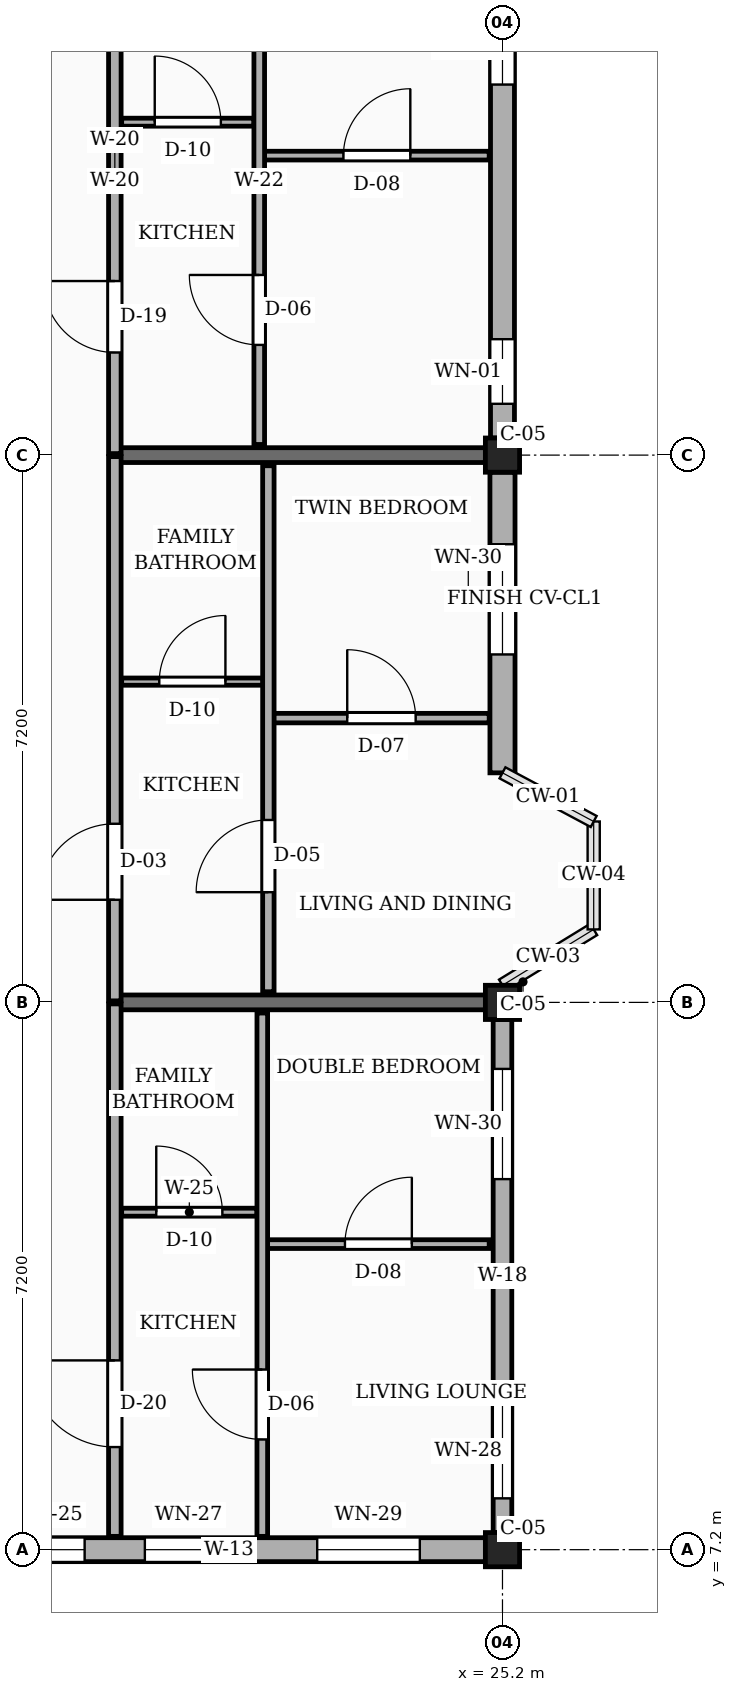
"""IFC4 building model, lengths in metres.
Left out: names, types, materials, properties, quantities, classifications, styles, units other than length and angle.
Written with IfcOpenShell. Run it as: python <this file> out.ifc"""

import sys

from ifc_helpers import new_model, si_unit, direction, frame, frame_2d, origin, origin_2d, place, context, subcontext, project, spatial, rectangle, extrude, element, fill, save


model = new_model("IFC4")
c1 = context("Model", 3, precision=1e-05, world=origin(), true_north=direction((0.0, 1.0)))
c2 = subcontext(c1, "Body", "Model", "MODEL_VIEW")
j1 = project(units=[si_unit("LENGTHUNIT", "METRE"), si_unit("PLANEANGLEUNIT", "RADIAN")], contexts=[c1])
p1 = place(None, origin())
s1 = spatial("IfcSite", under=j1, at=p1, CompositionType="ELEMENT")
p2 = place(p1, origin())
s2 = spatial("IfcBuilding", under=s1, at=p2, CompositionType="ELEMENT")
p3 = place(p2, frame((0.0, 0.0, 42.3)))
s3 = spatial("IfcBuildingStorey", under=s2, at=p3, CompositionType="ELEMENT", Elevation=42.3)
for number, where, z_axis, x_axis in (
    (1, (25.2, 7.2, 0.0), (0.0, 0.0, 1.0), (1.0, 0.0, 0.0)),
    (2, (25.2, 14.4, 0.0), (0.0, 0.0, 1.0), (1.0, 0.0, 0.0)),
    (3, (25.2, 21.6, 0.0), (0.0, 0.0, 1.0), (1.0, 0.0, 0.0)),
):
    element("IfcColumn", number, at=place(p3, frame(where, z_axis=z_axis, x_axis=x_axis)), inside=s3, PredefinedType="COLUMN", context=c2, shape_type="SweptSolid", body=[
        extrude(rectangle(XDim=0.45, YDim=0.45, at=origin_2d()), origin(), (0.0, 0.0, 1.0), 3.15),
    ])
for number, where, z_axis, x_axis in (
    (4, (20.1, 14.4, 0.0), (0.0, 0.0, 1.0), (1.0, 0.0, 0.0)),
    (5, (20.1, 21.6, 0.0), (0.0, 0.0, 1.0), (1.0, 0.0, 0.0)),
):
    element("IfcWall", number, at=place(p3, frame(where, z_axis=z_axis, x_axis=x_axis)), inside=s3, PredefinedType="SOLIDWALL", context=c2, shape_type="SweptSolid", body=[
        extrude(rectangle(XDim=4.875, YDim=0.195, at=frame_2d((2.438, 0.0))), origin(), (0.0, 0.0, 1.0), 2.17),
    ])
p4 = place(p3, frame((18.225, 7.2, 0.0), z_axis=(0.0, 0.0, 1.0), x_axis=(1.0, 0.0, 0.0)))
e6 = element("IfcWall", 6, at=p4, inside=s3, PredefinedType="SOLIDWALL", context=c2, shape_type="SweptSolid", body=[
    extrude(rectangle(XDim=6.75, YDim=0.315, at=frame_2d((3.375, 0.0))), origin(), (0.0, 0.0, 1.0), 2.44),
])
p5 = place(p4, frame((0.538, 0.0, 0.78)))
e7 = element("IfcOpeningElement", 7, at=p5, cuts=e6, PredefinedType="OPENING", context=c2, shape_type="SweptSolid", body=[
    extrude(rectangle(XDim=0.94, YDim=1.44, at=frame_2d((0.47, 0.72))), frame((0.0, 0.167, 0.0), z_axis=(0.0, -1.0, 0.0), x_axis=(1.0, 0.0, 0.0)), (0.0, 0.0, 1.0), 0.335),
])
p6 = place(p4, frame((2.27, 0.0, 0.78)))
e8 = element("IfcOpeningElement", 8, at=p6, cuts=e6, PredefinedType="OPENING", context=c2, shape_type="SweptSolid", body=[
    extrude(rectangle(XDim=1.15, YDim=1.44, at=frame_2d((0.575, 0.72))), frame((0.0, 0.167, 0.0), z_axis=(0.0, -1.0, 0.0), x_axis=(1.0, 0.0, 0.0)), (0.0, 0.0, 1.0), 0.335),
])
p7 = place(p4, frame((4.538, 0.0, 0.78)))
e9 = element("IfcOpeningElement", 9, at=p7, cuts=e6, PredefinedType="OPENING", context=c2, shape_type="SweptSolid", body=[
    extrude(rectangle(XDim=1.35, YDim=1.44, at=frame_2d((0.675, 0.72))), frame((0.0, 0.167, 0.0), z_axis=(0.0, -1.0, 0.0), x_axis=(1.0, 0.0, 0.0)), (0.0, 0.0, 1.0), 0.335),
])
p8 = place(p3, frame((25.2, 7.425, 0.0), z_axis=(0.0, 0.0, 1.0), x_axis=(0.0, 1.0, 0.0)))
e10 = element("IfcWall", 10, at=p8, inside=s3, PredefinedType="SOLIDWALL", context=c2, shape_type="SweptSolid", body=[
    extrude(rectangle(XDim=6.75, YDim=0.245, at=frame_2d((3.375, 0.0))), origin(), (0.0, 0.0, 1.0), 2.44),
])
p9 = place(p8, frame((0.45, 0.0, 0.78)))
e11 = element("IfcOpeningElement", 11, at=p9, cuts=e10, PredefinedType="OPENING", context=c2, shape_type="SweptSolid", body=[
    extrude(rectangle(XDim=1.25, YDim=1.44, at=frame_2d((0.625, 0.72))), frame((0.0, 0.133, 0.0), z_axis=(0.0, -1.0, 0.0), x_axis=(1.0, 0.0, 0.0)), (0.0, 0.0, 1.0), 0.265),
])
p10 = place(p8, frame((4.65, 0.0, 0.78)))
e12 = element("IfcOpeningElement", 12, at=p10, cuts=e10, PredefinedType="OPENING", context=c2, shape_type="SweptSolid", body=[
    extrude(rectangle(XDim=1.45, YDim=1.44, at=frame_2d((0.725, 0.72))), frame((0.0, 0.133, 0.0), z_axis=(0.0, -1.0, 0.0), x_axis=(1.0, 0.0, 0.0)), (0.0, 0.0, 1.0), 0.265),
])
p11 = place(p3, frame((25.2, 17.42, 0.0), z_axis=(0.0, 0.0, 1.0), x_axis=(0.0, 1.0, 0.0)))
e13 = element("IfcWall", 13, at=p11, inside=s3, PredefinedType="SOLIDWALL", context=c2, shape_type="SweptSolid", body=[
    extrude(rectangle(XDim=3.955, YDim=0.33, at=frame_2d((1.978, 0.0))), origin(), (0.0, 0.0, 1.0), 2.44),
])
p12 = place(p11, frame((1.558, 0.0, 0.78)))
e14 = element("IfcOpeningElement", 14, at=p12, cuts=e13, PredefinedType="OPENING", context=c2, shape_type="SweptSolid", body=[
    extrude(rectangle(XDim=1.45, YDim=1.44, at=frame_2d((0.725, 0.72))), frame((0.0, 0.175, 0.0), z_axis=(0.0, -1.0, 0.0), x_axis=(1.0, 0.0, 0.0)), (0.0, 0.0, 1.0), 0.35),
])
p13 = place(p3, frame((25.2, 21.825, 0.0), z_axis=(0.0, 0.0, 1.0), x_axis=(0.0, 1.0, 0.0)))
e15 = element("IfcWall", 15, at=p13, inside=s3, PredefinedType="SOLIDWALL", context=c2, shape_type="SweptSolid", body=[
    extrude(rectangle(XDim=6.75, YDim=0.315, at=frame_2d((3.375, 0.0))), origin(), (0.0, 0.0, 1.0), 2.44),
])
p14 = place(p13, frame((0.45, 0.0, 0.78)))
e16 = element("IfcOpeningElement", 16, at=p14, cuts=e15, PredefinedType="OPENING", context=c2, shape_type="SweptSolid", body=[
    extrude(rectangle(XDim=0.85, YDim=1.15, at=frame_2d((0.425, 0.575))), frame((0.0, 0.167, 0.0), z_axis=(0.0, -1.0, 0.0), x_axis=(1.0, 0.0, 0.0)), (0.0, 0.0, 1.0), 0.335),
])
p15 = place(p13, frame((4.65, 0.0, 0.78)))
e17 = element("IfcOpeningElement", 17, at=p15, cuts=e15, PredefinedType="OPENING", context=c2, shape_type="SweptSolid", body=[
    extrude(rectangle(XDim=1.0, YDim=1.15, at=frame_2d((0.5, 0.575))), frame((0.0, 0.167, 0.0), z_axis=(0.0, -1.0, 0.0), x_axis=(1.0, 0.0, 0.0)), (0.0, 0.0, 1.0), 0.335),
])
p16 = place(p3, frame((20.1, 7.375, 0.0), z_axis=(0.0, 0.0, 1.0), x_axis=(0.0, 1.0, 0.0)))
e18 = element("IfcWall", 18, at=p16, inside=s3, PredefinedType="PARTITIONING", context=c2, shape_type="SweptSolid", body=[
    extrude(rectangle(XDim=7.005, YDim=0.165, at=frame_2d((3.502, 0.0))), origin(), (0.0, 0.0, 1.0), 2.305),
])
p17 = place(p16, frame((1.175, 0.0, 0.0)))
e19 = element("IfcOpeningElement", 19, at=p17, cuts=e18, PredefinedType="OPENING", context=c2, shape_type="SweptSolid", body=[
    extrude(rectangle(XDim=1.14, YDim=2.18, at=frame_2d((0.57, 1.09))), frame((0.0, 0.093, 0.0), z_axis=(0.0, -1.0, 0.0), x_axis=(1.0, 0.0, 0.0)), (0.0, 0.0, 1.0), 0.185),
])
p18 = place(p3, frame((20.1, 14.42, 0.0), z_axis=(0.0, 0.0, 1.0), x_axis=(0.0, 1.0, 0.0)))
e20 = element("IfcWall", 20, at=p18, inside=s3, PredefinedType="PARTITIONING", context=c2, shape_type="SweptSolid", body=[
    extrude(rectangle(XDim=7.16, YDim=0.165, at=frame_2d((3.58, 0.0))), origin(), (0.0, 0.0, 1.0), 2.305),
])
p19 = place(p18, frame((1.33, 0.0, 0.0)))
e21 = element("IfcOpeningElement", 21, at=p19, cuts=e20, PredefinedType="OPENING", context=c2, shape_type="SweptSolid", body=[
    extrude(rectangle(XDim=1.0, YDim=2.15, at=frame_2d((0.5, 1.075))), frame((0.0, 0.093, 0.0), z_axis=(0.0, -1.0, 0.0), x_axis=(1.0, 0.0, 0.0)), (0.0, 0.0, 1.0), 0.185),
])
p20 = place(p3, frame((20.1, 21.62, 0.0), z_axis=(0.0, 0.0, 1.0), x_axis=(0.0, 1.0, 0.0)))
e22 = element("IfcWall", 22, at=p20, inside=s3, PredefinedType="PARTITIONING", context=c2, shape_type="SweptSolid", body=[
    extrude(rectangle(XDim=7.16, YDim=0.165, at=frame_2d((3.58, 0.0))), origin(), (0.0, 0.0, 1.0), 2.305),
])
p21 = place(p20, frame((1.33, 0.0, 0.0)))
e23 = element("IfcOpeningElement", 23, at=p21, cuts=e22, PredefinedType="OPENING", context=c2, shape_type="SweptSolid", body=[
    extrude(rectangle(XDim=0.94, YDim=2.12, at=frame_2d((0.47, 1.06))), frame((0.0, 0.093, 0.0), z_axis=(0.0, -1.0, 0.0), x_axis=(1.0, 0.0, 0.0)), (0.0, 0.0, 1.0), 0.185),
])
p22 = place(p3, frame((22.11, 11.22, 0.0), z_axis=(0.0, 0.0, 1.0), x_axis=(1.0, 0.0, 0.0)))
e24 = element("IfcWall", 24, at=p22, inside=s3, PredefinedType="PARTITIONING", context=c2, shape_type="SweptSolid", body=[
    extrude(rectangle(XDim=2.915, YDim=0.115, at=frame_2d((1.458, 0.0))), origin(), (0.0, 0.0, 1.0), 2.305),
])
p23 = place(p22, frame((1.018, 0.0, 0.0)))
e25 = element("IfcOpeningElement", 25, at=p23, cuts=e24, PredefinedType="OPENING", context=c2, shape_type="SweptSolid", body=[
    extrude(rectangle(XDim=0.88, YDim=2.08, at=frame_2d((0.44, 1.04))), frame((0.0, 0.067, 0.0), z_axis=(0.0, -1.0, 0.0), x_axis=(1.0, 0.0, 0.0)), (0.0, 0.0, 1.0), 0.135),
])
p24 = place(p3, frame((20.19, 11.64, 0.0), z_axis=(0.0, 0.0, 1.0), x_axis=(1.0, 0.0, 0.0)))
e26 = element("IfcWall", 26, at=p24, inside=s3, PredefinedType="PARTITIONING", context=c2, shape_type="SweptSolid", body=[
    extrude(rectangle(XDim=1.78, YDim=0.105, at=frame_2d((0.89, 0.0))), origin(), (0.0, 0.0, 1.0), 2.305),
])
p25 = place(p24, frame((0.455, 0.0, 0.0)))
e27 = element("IfcOpeningElement", 27, at=p25, cuts=e26, PredefinedType="OPENING", context=c2, shape_type="SweptSolid", body=[
    extrude(rectangle(XDim=0.87, YDim=2.05, at=frame_2d((0.435, 1.025))), frame((0.0, 0.062, 0.0), z_axis=(0.0, -1.0, 0.0), x_axis=(1.0, 0.0, 0.0)), (0.0, 0.0, 1.0), 0.125),
])
p26 = place(p3, frame((22.04, 7.375, 0.0), z_axis=(0.0, 0.0, 1.0), x_axis=(0.0, 1.0, 0.0)))
e28 = element("IfcWall", 28, at=p26, inside=s3, PredefinedType="PARTITIONING", context=c2, shape_type="SweptSolid", body=[
    extrude(rectangle(XDim=6.885, YDim=0.14, at=frame_2d((3.442, 0.0))), origin(), (0.0, 0.0, 1.0), 2.305),
])
p27 = place(p26, frame((1.275, 0.0, 0.0)))
e29 = element("IfcOpeningElement", 29, at=p27, cuts=e28, PredefinedType="OPENING", context=c2, shape_type="SweptSolid", body=[
    extrude(rectangle(XDim=0.92, YDim=2.1, at=frame_2d((0.46, 1.05))), frame((0.0, 0.08, 0.0), z_axis=(0.0, -1.0, 0.0), x_axis=(1.0, 0.0, 0.0)), (0.0, 0.0, 1.0), 0.16),
])
p28 = place(p3, frame((22.19, 18.14, 0.0), z_axis=(0.0, 0.0, 1.0), x_axis=(1.0, 0.0, 0.0)))
e30 = element("IfcWall", 30, at=p28, inside=s3, PredefinedType="PARTITIONING", context=c2, shape_type="SweptSolid", body=[
    extrude(rectangle(XDim=2.835, YDim=0.125, at=frame_2d((1.417, 0.0))), origin(), (0.0, 0.0, 1.0), 2.305),
])
p29 = place(p28, frame((0.968, 0.0, 0.0)))
e31 = element("IfcOpeningElement", 31, at=p29, cuts=e30, PredefinedType="OPENING", context=c2, shape_type="SweptSolid", body=[
    extrude(rectangle(XDim=0.9, YDim=2.1, at=frame_2d((0.45, 1.05))), frame((0.0, 0.073, 0.0), z_axis=(0.0, -1.0, 0.0), x_axis=(1.0, 0.0, 0.0)), (0.0, 0.0, 1.0), 0.145),
])
p30 = place(p3, frame((20.19, 18.62, 0.0), z_axis=(0.0, 0.0, 1.0), x_axis=(1.0, 0.0, 0.0)))
e32 = element("IfcWall", 32, at=p30, inside=s3, PredefinedType="PARTITIONING", context=c2, shape_type="SweptSolid", body=[
    extrude(rectangle(XDim=1.86, YDim=0.095, at=frame_2d((0.93, 0.0))), origin(), (0.0, 0.0, 1.0), 2.305),
])
p31 = place(p30, frame((0.495, 0.0, 0.0)))
e33 = element("IfcOpeningElement", 33, at=p31, cuts=e32, PredefinedType="OPENING", context=c2, shape_type="SweptSolid", body=[
    extrude(rectangle(XDim=0.87, YDim=2.05, at=frame_2d((0.435, 1.025))), frame((0.0, 0.058, 0.0), z_axis=(0.0, -1.0, 0.0), x_axis=(1.0, 0.0, 0.0)), (0.0, 0.0, 1.0), 0.115),
])
p32 = place(p3, frame((22.12, 14.54, 0.0), z_axis=(0.0, 0.0, 1.0), x_axis=(0.0, 1.0, 0.0)))
e34 = element("IfcWall", 34, at=p32, inside=s3, PredefinedType="PARTITIONING", context=c2, shape_type="SweptSolid", body=[
    extrude(rectangle(XDim=6.92, YDim=0.15, at=frame_2d((3.46, 0.0))), origin(), (0.0, 0.0, 1.0), 2.305),
])
p33 = place(p32, frame((1.31, 0.0, 0.0)))
e35 = element("IfcOpeningElement", 35, at=p33, cuts=e34, PredefinedType="OPENING", context=c2, shape_type="SweptSolid", body=[
    extrude(rectangle(XDim=0.95, YDim=2.1, at=frame_2d((0.475, 1.05))), frame((0.0, 0.085, 0.0), z_axis=(0.0, -1.0, 0.0), x_axis=(1.0, 0.0, 0.0)), (0.0, 0.0, 1.0), 0.17),
])
p34 = place(p3, frame((22.07, 25.54, 0.0), z_axis=(0.0, 0.0, 1.0), x_axis=(1.0, 0.0, 0.0)))
e36 = element("IfcWall", 36, at=p34, inside=s3, PredefinedType="PARTITIONING", context=c2, shape_type="SweptSolid", body=[
    extrude(rectangle(XDim=2.955, YDim=0.115, at=frame_2d((1.478, 0.0))), origin(), (0.0, 0.0, 1.0), 2.305),
])
p35 = place(p34, frame((1.038, 0.0, 0.0)))
e37 = element("IfcOpeningElement", 37, at=p35, cuts=e36, PredefinedType="OPENING", context=c2, shape_type="SweptSolid", body=[
    extrude(rectangle(XDim=0.88, YDim=2.08, at=frame_2d((0.44, 1.04))), frame((0.0, 0.067, 0.0), z_axis=(0.0, -1.0, 0.0), x_axis=(1.0, 0.0, 0.0)), (0.0, 0.0, 1.0), 0.135),
])
p36 = place(p3, frame((20.19, 25.98, 0.0), z_axis=(0.0, 0.0, 1.0), x_axis=(1.0, 0.0, 0.0)))
e38 = element("IfcWall", 38, at=p36, inside=s3, PredefinedType="PARTITIONING", context=c2, shape_type="SweptSolid", body=[
    extrude(rectangle(XDim=1.74, YDim=0.105, at=frame_2d((0.87, 0.0))), origin(), (0.0, 0.0, 1.0), 2.305),
])
p37 = place(p36, frame((0.435, 0.0, 0.0)))
e39 = element("IfcOpeningElement", 39, at=p37, cuts=e38, PredefinedType="OPENING", context=c2, shape_type="SweptSolid", body=[
    extrude(rectangle(XDim=0.87, YDim=2.05, at=frame_2d((0.435, 1.025))), frame((0.0, 0.062, 0.0), z_axis=(0.0, -1.0, 0.0), x_axis=(1.0, 0.0, 0.0)), (0.0, 0.0, 1.0), 0.125),
])
p38 = place(p3, frame((22.0, 21.74, 0.0), z_axis=(0.0, 0.0, 1.0), x_axis=(0.0, 1.0, 0.0)))
e40 = element("IfcWall", 40, at=p38, inside=s3, PredefinedType="PARTITIONING", context=c2, shape_type="SweptSolid", body=[
    extrude(rectangle(XDim=6.92, YDim=0.14, at=frame_2d((3.46, 0.0))), origin(), (0.0, 0.0, 1.0), 2.305),
])
p39 = place(p38, frame((1.31, 0.0, 0.0)))
e41 = element("IfcOpeningElement", 41, at=p39, cuts=e40, PredefinedType="OPENING", context=c2, shape_type="SweptSolid", body=[
    extrude(rectangle(XDim=0.92, YDim=2.1, at=frame_2d((0.46, 1.05))), frame((0.0, 0.08, 0.0), z_axis=(0.0, -1.0, 0.0), x_axis=(1.0, 0.0, 0.0)), (0.0, 0.0, 1.0), 0.16),
])
p40 = place(p5, origin())
e42 = element("IfcWindow", 42, at=p40, inside=s3, PartitioningType="SINGLE_PANEL", PredefinedType="WINDOW", context=c2, shape_type="SweptSolid", body=[
    extrude(rectangle(XDim=0.94, YDim=1.44, at=frame_2d((0.47, 0.72))), frame((0.0, 0.03, 0.0), z_axis=(0.0, -1.0, 0.0), x_axis=(1.0, 0.0, 0.0)), (0.0, 0.0, 1.0), 0.06),
])
fill(e7, e42)
p41 = place(p6, origin())
e43 = element("IfcWindow", 43, at=p41, inside=s3, PartitioningType="SINGLE_PANEL", PredefinedType="WINDOW", context=c2, shape_type="SweptSolid", body=[
    extrude(rectangle(XDim=1.15, YDim=1.44, at=frame_2d((0.575, 0.72))), frame((0.0, 0.03, 0.0), z_axis=(0.0, -1.0, 0.0), x_axis=(1.0, 0.0, 0.0)), (0.0, 0.0, 1.0), 0.06),
])
fill(e8, e43)
p42 = place(p7, origin())
e44 = element("IfcWindow", 44, at=p42, inside=s3, PartitioningType="SINGLE_PANEL", PredefinedType="WINDOW", context=c2, shape_type="SweptSolid", body=[
    extrude(rectangle(XDim=1.35, YDim=1.44, at=frame_2d((0.675, 0.72))), frame((0.0, 0.03, 0.0), z_axis=(0.0, -1.0, 0.0), x_axis=(1.0, 0.0, 0.0)), (0.0, 0.0, 1.0), 0.06),
])
fill(e9, e44)
p43 = place(p9, origin())
e45 = element("IfcWindow", 45, at=p43, inside=s3, PartitioningType="SINGLE_PANEL", PredefinedType="WINDOW", context=c2, shape_type="SweptSolid", body=[
    extrude(rectangle(XDim=1.25, YDim=1.44, at=frame_2d((0.625, 0.72))), frame((0.0, 0.03, 0.0), z_axis=(0.0, -1.0, 0.0), x_axis=(1.0, 0.0, 0.0)), (0.0, 0.0, 1.0), 0.06),
])
fill(e11, e45)
p44 = place(p10, origin())
e46 = element("IfcWindow", 46, at=p44, inside=s3, PartitioningType="SINGLE_PANEL", PredefinedType="WINDOW", context=c2, shape_type="SweptSolid", body=[
    extrude(rectangle(XDim=1.45, YDim=1.44, at=frame_2d((0.725, 0.72))), frame((0.0, 0.03, 0.0), z_axis=(0.0, -1.0, 0.0), x_axis=(1.0, 0.0, 0.0)), (0.0, 0.0, 1.0), 0.06),
])
fill(e12, e46)
p45 = place(p12, origin())
e47 = element("IfcWindow", 47, at=p45, inside=s3, PartitioningType="SINGLE_PANEL", PredefinedType="WINDOW", context=c2, shape_type="SweptSolid", body=[
    extrude(rectangle(XDim=1.45, YDim=1.44, at=frame_2d((0.725, 0.72))), frame((0.0, 0.03, 0.0), z_axis=(0.0, -1.0, 0.0), x_axis=(1.0, 0.0, 0.0)), (0.0, 0.0, 1.0), 0.06),
])
fill(e14, e47)
p46 = place(p14, origin())
e48 = element("IfcWindow", 48, at=p46, inside=s3, PartitioningType="SINGLE_PANEL", PredefinedType="WINDOW", context=c2, shape_type="SweptSolid", body=[
    extrude(rectangle(XDim=0.85, YDim=1.15, at=frame_2d((0.425, 0.575))), frame((0.0, 0.03, 0.0), z_axis=(0.0, -1.0, 0.0), x_axis=(1.0, 0.0, 0.0)), (0.0, 0.0, 1.0), 0.06),
])
fill(e16, e48)
p47 = place(p15, origin())
e49 = element("IfcWindow", 49, at=p47, inside=s3, PartitioningType="SINGLE_PANEL", PredefinedType="WINDOW", context=c2, shape_type="SweptSolid", body=[
    extrude(rectangle(XDim=1.0, YDim=1.15, at=frame_2d((0.5, 0.575))), frame((0.0, 0.03, 0.0), z_axis=(0.0, -1.0, 0.0), x_axis=(1.0, 0.0, 0.0)), (0.0, 0.0, 1.0), 0.06),
])
fill(e17, e49)
p48 = place(p17, origin())
e50 = element("IfcDoor", 50, at=p48, inside=s3, OperationType="SINGLE_SWING_RIGHT", PredefinedType="DOOR", context=c2, shape_type="SweptSolid", body=[
    extrude(rectangle(XDim=1.14, YDim=2.18, at=frame_2d((0.57, 1.09))), frame((0.0, 0.025, 0.0), z_axis=(0.0, -1.0, 0.0), x_axis=(1.0, 0.0, 0.0)), (0.0, 0.0, 1.0), 0.05),
])
fill(e19, e50)
p49 = place(p19, origin())
e51 = element("IfcDoor", 51, at=p49, inside=s3, OperationType="SINGLE_SWING_LEFT", PredefinedType="DOOR", context=c2, shape_type="SweptSolid", body=[
    extrude(rectangle(XDim=1.0, YDim=2.15, at=frame_2d((0.5, 1.075))), frame((0.0, 0.025, 0.0), z_axis=(0.0, -1.0, 0.0), x_axis=(1.0, 0.0, 0.0)), (0.0, 0.0, 1.0), 0.05),
])
fill(e21, e51)
p50 = place(p21, origin())
e52 = element("IfcDoor", 52, at=p50, inside=s3, OperationType="SINGLE_SWING_RIGHT", PredefinedType="DOOR", context=c2, shape_type="SweptSolid", body=[
    extrude(rectangle(XDim=0.94, YDim=2.12, at=frame_2d((0.47, 1.06))), frame((0.0, 0.025, 0.0), z_axis=(0.0, -1.0, 0.0), x_axis=(1.0, 0.0, 0.0)), (0.0, 0.0, 1.0), 0.05),
])
fill(e23, e52)
p51 = place(p23, origin())
e53 = element("IfcDoor", 53, at=p51, inside=s3, OperationType="SINGLE_SWING_RIGHT", PredefinedType="DOOR", context=c2, shape_type="SweptSolid", body=[
    extrude(rectangle(XDim=0.88, YDim=2.08, at=frame_2d((0.44, 1.04))), frame((0.0, 0.025, 0.0), z_axis=(0.0, -1.0, 0.0), x_axis=(1.0, 0.0, 0.0)), (0.0, 0.0, 1.0), 0.05),
])
fill(e25, e53)
p52 = place(p25, origin())
e54 = element("IfcDoor", 54, at=p52, inside=s3, OperationType="SINGLE_SWING_LEFT", PredefinedType="DOOR", context=c2, shape_type="SweptSolid", body=[
    extrude(rectangle(XDim=0.87, YDim=2.05, at=frame_2d((0.435, 1.025))), frame((0.0, 0.025, 0.0), z_axis=(0.0, -1.0, 0.0), x_axis=(1.0, 0.0, 0.0)), (0.0, 0.0, 1.0), 0.05),
])
fill(e27, e54)
p53 = place(p27, origin())
e55 = element("IfcDoor", 55, at=p53, inside=s3, OperationType="SINGLE_SWING_RIGHT", PredefinedType="DOOR", context=c2, shape_type="SweptSolid", body=[
    extrude(rectangle(XDim=0.92, YDim=2.1, at=frame_2d((0.46, 1.05))), frame((0.0, 0.025, 0.0), z_axis=(0.0, -1.0, 0.0), x_axis=(1.0, 0.0, 0.0)), (0.0, 0.0, 1.0), 0.05),
])
fill(e29, e55)
p54 = place(p29, origin())
e56 = element("IfcDoor", 56, at=p54, inside=s3, OperationType="SINGLE_SWING_LEFT", PredefinedType="DOOR", context=c2, shape_type="SweptSolid", body=[
    extrude(rectangle(XDim=0.9, YDim=2.1, at=frame_2d((0.45, 1.05))), frame((0.0, 0.025, 0.0), z_axis=(0.0, -1.0, 0.0), x_axis=(1.0, 0.0, 0.0)), (0.0, 0.0, 1.0), 0.05),
])
fill(e31, e56)
p55 = place(p31, origin())
e57 = element("IfcDoor", 57, at=p55, inside=s3, OperationType="SINGLE_SWING_RIGHT", PredefinedType="DOOR", context=c2, shape_type="SweptSolid", body=[
    extrude(rectangle(XDim=0.87, YDim=2.05, at=frame_2d((0.435, 1.025))), frame((0.0, 0.025, 0.0), z_axis=(0.0, -1.0, 0.0), x_axis=(1.0, 0.0, 0.0)), (0.0, 0.0, 1.0), 0.05),
])
fill(e33, e57)
p56 = place(p33, origin())
e58 = element("IfcDoor", 58, at=p56, inside=s3, OperationType="SINGLE_SWING_LEFT", PredefinedType="DOOR", context=c2, shape_type="SweptSolid", body=[
    extrude(rectangle(XDim=0.95, YDim=2.1, at=frame_2d((0.475, 1.05))), frame((0.0, 0.025, 0.0), z_axis=(0.0, -1.0, 0.0), x_axis=(1.0, 0.0, 0.0)), (0.0, 0.0, 1.0), 0.05),
])
fill(e35, e58)
p57 = place(p35, origin())
e59 = element("IfcDoor", 59, at=p57, inside=s3, OperationType="SINGLE_SWING_RIGHT", PredefinedType="DOOR", context=c2, shape_type="SweptSolid", body=[
    extrude(rectangle(XDim=0.88, YDim=2.08, at=frame_2d((0.44, 1.04))), frame((0.0, 0.025, 0.0), z_axis=(0.0, -1.0, 0.0), x_axis=(1.0, 0.0, 0.0)), (0.0, 0.0, 1.0), 0.05),
])
fill(e37, e59)
p58 = place(p37, origin())
e60 = element("IfcDoor", 60, at=p58, inside=s3, OperationType="SINGLE_SWING_LEFT", PredefinedType="DOOR", context=c2, shape_type="SweptSolid", body=[
    extrude(rectangle(XDim=0.87, YDim=2.05, at=frame_2d((0.435, 1.025))), frame((0.0, 0.025, 0.0), z_axis=(0.0, -1.0, 0.0), x_axis=(1.0, 0.0, 0.0)), (0.0, 0.0, 1.0), 0.05),
])
fill(e39, e60)
p59 = place(p39, origin())
e61 = element("IfcDoor", 61, at=p59, inside=s3, OperationType="SINGLE_SWING_RIGHT", PredefinedType="DOOR", context=c2, shape_type="SweptSolid", body=[
    extrude(rectangle(XDim=0.92, YDim=2.1, at=frame_2d((0.46, 1.05))), frame((0.0, 0.025, 0.0), z_axis=(0.0, -1.0, 0.0), x_axis=(1.0, 0.0, 0.0)), (0.0, 0.0, 1.0), 0.05),
])
fill(e41, e61)
save(model, sys.argv[1])
